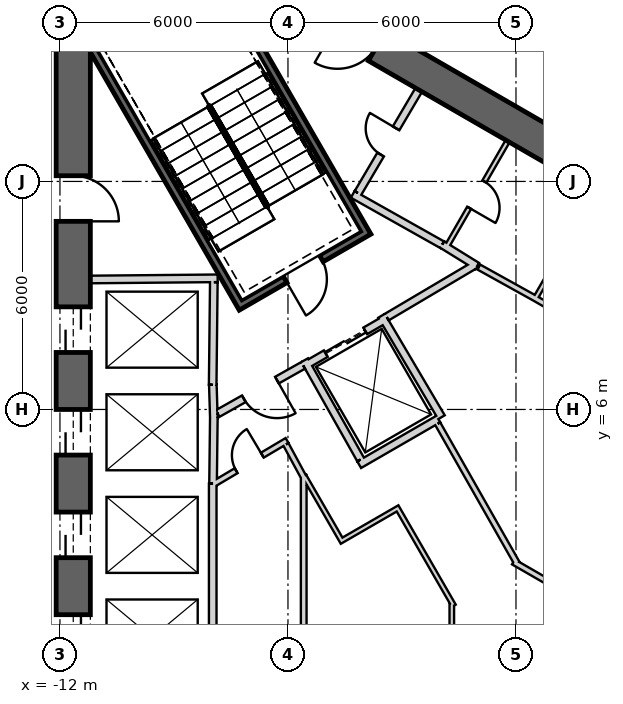
"""IFC4 building model, lengths in metres.
Left out: names, types, materials, properties, quantities, classifications, styles, units other than length and angle.
Written with IfcOpenShell. Run it as: python <this file> out.ifc"""

import sys

from ifc_helpers import new_model, si_unit, direction, frame, frame_2d, origin, place, context, subcontext, project, spatial, rectangle, extrude, element, fill, save


model = new_model("IFC4")
c1 = context("Model", 3, precision=1e-05, world=origin(), true_north=direction((0.0, 1.0)))
c2 = subcontext(c1, "Body", "Model", "MODEL_VIEW")
j1 = project(units=[si_unit("LENGTHUNIT", "METRE"), si_unit("PLANEANGLEUNIT", "RADIAN")], contexts=[c1])
p1 = place(None, origin())
s1 = spatial("IfcSite", under=j1, at=p1, CompositionType="ELEMENT")
p2 = place(p1, origin())
s2 = spatial("IfcBuilding", under=s1, at=p2, CompositionType="ELEMENT")
p3 = place(p2, frame((0.0, 0.0, 277.2)))
s3 = spatial("IfcBuildingStorey", under=s2, at=p3, CompositionType="ELEMENT", Elevation=277.2)
p4 = place(p3, frame((19.475, 2.208, 0.0), z_axis=(0.0, 0.0, 1.0), x_axis=(-0.866028369851, 0.499994862586, 0.0)))
e1 = element("IfcWall", 1, at=p4, inside=s3, PredefinedType="SHEAR", context=c2, shape_type="SweptSolid", body=[
    extrude(rectangle(XDim=31.523, YDim=0.9, at=frame_2d((15.762, 0.0))), origin(), (0.0, 0.0, 1.0), 6.5),
])
p5 = place(p4, frame((7.062, 0.0, 0.0)))
e2 = element("IfcOpeningElement", 2, at=p5, cuts=e1, PredefinedType="OPENING", context=c2, shape_type="SweptSolid", body=[
    extrude(rectangle(XDim=1.2, YDim=2.4, at=frame_2d((0.6, 1.2))), frame((0.0, 0.46, 0.0), z_axis=(0.0, -1.0, 0.0), x_axis=(1.0, 0.0, 0.0)), (0.0, 0.0, 1.0), 0.92),
])
p6 = place(p4, frame((3.612, 0.0, 0.0)))
e3 = element("IfcOpeningElement", 3, at=p6, cuts=e1, PredefinedType="OPENING", context=c2, shape_type="SweptSolid", body=[
    extrude(rectangle(XDim=1.2, YDim=2.4, at=frame_2d((0.6, 1.2))), frame((0.0, 0.46, 0.0), z_axis=(0.0, -1.0, 0.0), x_axis=(1.0, 0.0, 0.0)), (0.0, 0.0, 1.0), 0.92),
])
p7 = place(p4, frame((26.712, 0.0, 0.0)))
e4 = element("IfcOpeningElement", 4, at=p7, cuts=e1, PredefinedType="OPENING", context=c2, shape_type="SweptSolid", body=[
    extrude(rectangle(XDim=1.2, YDim=2.4, at=frame_2d((0.6, 1.2))), frame((0.0, 0.46, 0.0), z_axis=(0.0, -1.0, 0.0), x_axis=(1.0, 0.0, 0.0)), (0.0, 0.0, 1.0), 0.92),
])
p8 = place(p3, frame((-11.65, 15.762, 0.0), z_axis=(0.0, 0.0, 1.0), x_axis=(0.0, -1.0, 0.0)))
e5 = element("IfcWall", 5, at=p8, inside=s3, PredefinedType="SHEAR", context=c2, shape_type="SweptSolid", body=[
    extrude(rectangle(XDim=31.523, YDim=0.9, at=frame_2d((15.762, 0.0))), origin(), (0.0, 0.0, 1.0), 6.5),
])
p9 = place(p8, frame((7.062, 0.0, 0.0)))
e6 = element("IfcOpeningElement", 6, at=p9, cuts=e5, PredefinedType="OPENING", context=c2, shape_type="SweptSolid", body=[
    extrude(rectangle(XDim=1.2, YDim=2.4, at=frame_2d((0.6, 1.2))), frame((0.0, 0.46, 0.0), z_axis=(0.0, -1.0, 0.0), x_axis=(1.0, 0.0, 0.0)), (0.0, 0.0, 1.0), 0.92),
])
p10 = place(p8, frame((9.762, 0.0, 0.0)))
e7 = element("IfcOpeningElement", 7, at=p10, cuts=e5, PredefinedType="OPENING", context=c2, shape_type="SweptSolid", body=[
    extrude(rectangle(XDim=1.2, YDim=2.4, at=frame_2d((0.6, 1.2))), frame((0.0, 0.46, 0.0), z_axis=(0.0, -1.0, 0.0), x_axis=(1.0, 0.0, 0.0)), (0.0, 0.0, 1.0), 0.92),
])
p11 = place(p8, frame((12.462, 0.0, 0.0)))
e8 = element("IfcOpeningElement", 8, at=p11, cuts=e5, PredefinedType="OPENING", context=c2, shape_type="SweptSolid", body=[
    extrude(rectangle(XDim=1.2, YDim=2.4, at=frame_2d((0.6, 1.2))), frame((0.0, 0.46, 0.0), z_axis=(0.0, -1.0, 0.0), x_axis=(1.0, 0.0, 0.0)), (0.0, 0.0, 1.0), 0.92),
])
p12 = place(p8, frame((15.162, 0.0, 0.0)))
e9 = element("IfcOpeningElement", 9, at=p12, cuts=e5, PredefinedType="OPENING", context=c2, shape_type="SweptSolid", body=[
    extrude(rectangle(XDim=1.2, YDim=2.4, at=frame_2d((0.6, 1.2))), frame((0.0, 0.46, 0.0), z_axis=(0.0, -1.0, 0.0), x_axis=(1.0, 0.0, 0.0)), (0.0, 0.0, 1.0), 0.92),
])
p13 = place(p8, frame((17.862, 0.0, 0.0)))
e10 = element("IfcOpeningElement", 10, at=p13, cuts=e5, PredefinedType="OPENING", context=c2, shape_type="SweptSolid", body=[
    extrude(rectangle(XDim=1.2, YDim=2.4, at=frame_2d((0.6, 1.2))), frame((0.0, 0.46, 0.0), z_axis=(0.0, -1.0, 0.0), x_axis=(1.0, 0.0, 0.0)), (0.0, 0.0, 1.0), 0.92),
])
p14 = place(p8, frame((20.562, 0.0, 0.0)))
e11 = element("IfcOpeningElement", 11, at=p14, cuts=e5, PredefinedType="OPENING", context=c2, shape_type="SweptSolid", body=[
    extrude(rectangle(XDim=1.2, YDim=2.4, at=frame_2d((0.6, 1.2))), frame((0.0, 0.46, 0.0), z_axis=(0.0, -1.0, 0.0), x_axis=(1.0, 0.0, 0.0)), (0.0, 0.0, 1.0), 0.92),
])
p15 = place(p8, frame((23.262, 0.0, 0.0)))
e12 = element("IfcOpeningElement", 12, at=p15, cuts=e5, PredefinedType="OPENING", context=c2, shape_type="SweptSolid", body=[
    extrude(rectangle(XDim=1.2, YDim=2.4, at=frame_2d((0.6, 1.2))), frame((0.0, 0.46, 0.0), z_axis=(0.0, -1.0, 0.0), x_axis=(1.0, 0.0, 0.0)), (0.0, 0.0, 1.0), 0.92),
])
p16 = place(p8, frame((3.612, 0.0, 0.0)))
e13 = element("IfcOpeningElement", 13, at=p16, cuts=e5, PredefinedType="OPENING", context=c2, shape_type="SweptSolid", body=[
    extrude(rectangle(XDim=1.2, YDim=2.4, at=frame_2d((0.6, 1.2))), frame((0.0, 0.46, 0.0), z_axis=(0.0, -1.0, 0.0), x_axis=(1.0, 0.0, 0.0)), (0.0, 0.0, 1.0), 0.92),
])
p17 = place(p8, frame((26.712, 0.0, 0.0)))
e14 = element("IfcOpeningElement", 14, at=p17, cuts=e5, PredefinedType="OPENING", context=c2, shape_type="SweptSolid", body=[
    extrude(rectangle(XDim=1.2, YDim=2.4, at=frame_2d((0.6, 1.2))), frame((0.0, 0.46, 0.0), z_axis=(0.0, -1.0, 0.0), x_axis=(1.0, 0.0, 0.0)), (0.0, 0.0, 1.0), 0.92),
])
p18 = place(p3, frame((-11.2, 9.42, 0.0), z_axis=(0.0, 0.0, 1.0), x_axis=(0.999957167047, 0.009255488683, 0.0)))
e15 = element("IfcWall", 15, at=p18, inside=s3, PredefinedType="PLUMBINGWALL", context=c2, shape_type="SweptSolid", body=[
    extrude(rectangle(XDim=3.35, YDim=0.2, at=frame_2d((1.675, 0.0))), origin(), (0.0, 0.0, 1.0), 6.1),
])
p19 = place(p3, frame((-7.951, 9.35, 0.0), z_axis=(0.0, 0.0, 1.0), x_axis=(-0.011120469654, -0.999938165666, 0.0)))
e16 = element("IfcWall", 16, at=p19, inside=s3, PredefinedType="PLUMBINGWALL", context=c2, shape_type="SweptSolid", body=[
    extrude(rectangle(XDim=2.7, YDim=0.2, at=frame_2d((1.35, 0.0))), origin(), (0.0, 0.0, 1.0), 6.1),
])
p20 = place(p3, frame((-7.977, 6.65, 0.0), z_axis=(0.0, 0.0, 1.0), x_axis=(0.030861509705, -0.999523670164, 0.0)))
e17 = element("IfcWall", 17, at=p20, inside=s3, PredefinedType="PLUMBINGWALL", context=c2, shape_type="SweptSolid", body=[
    extrude(rectangle(XDim=0.878, YDim=0.2, at=frame_2d((0.439, 0.0))), origin(), (0.0, 0.0, 1.0), 6.1),
])
p21 = place(p3, frame((-7.949, 5.895, 0.0), z_axis=(0.0, 0.0, 1.0), x_axis=(-0.012042535896, -0.999927486035, 0.0)))
e18 = element("IfcWall", 18, at=p21, inside=s3, PredefinedType="PLUMBINGWALL", context=c2, shape_type="SweptSolid", body=[
    extrude(rectangle(XDim=1.845, YDim=0.2, at=frame_2d((0.922, 0.0))), origin(), (0.0, 0.0, 1.0), 6.1),
])
p22 = place(p3, frame((-7.98, 4.05, 0.0), z_axis=(0.0, 0.0, 1.0), x_axis=(0.0, -1.0, 0.0)))
e19 = element("IfcWall", 19, at=p22, inside=s3, PredefinedType="PLUMBINGWALL", context=c2, shape_type="SweptSolid", body=[
    extrude(rectangle(XDim=8.1, YDim=0.2, at=frame_2d((4.05, 0.0))), origin(), (0.0, 0.0, 1.0), 6.1),
])
p23 = place(p3, frame((-11.245, 15.678, -0.35), z_axis=(0.0, 0.0, 1.0), x_axis=(0.499977274689, -0.866038523851, 0.0)))
e20 = element("IfcWall", 20, at=p23, inside=s3, PredefinedType="SHEAR", context=c2, shape_type="SweptSolid", body=[
    extrude(rectangle(XDim=8.1, YDim=0.2, at=frame_2d((4.05, 0.0))), origin(), (0.0, 0.0, 1.0), 6.45),
])
p24 = place(p3, frame((-7.854, 17.405, -0.35), z_axis=(0.0, 0.0, 1.0), x_axis=(0.499997992926, -0.866026562566, 0.0)))
e21 = element("IfcWall", 21, at=p24, inside=s3, PredefinedType="SHEAR", context=c2, shape_type="SweptSolid", body=[
    extrude(rectangle(XDim=7.9, YDim=0.2, at=frame_2d((3.95, 0.0))), origin(), (0.0, 0.0, 1.0), 6.45),
])
p25 = place(p3, frame((-7.159, 8.8, -0.35), z_axis=(0.0, 0.0, 1.0), x_axis=(0.866047807691, 0.499961193289, 0.0)))
e22 = element("IfcWall", 22, at=p25, inside=s3, PredefinedType="SHEAR", context=c2, shape_type="SweptSolid", body=[
    extrude(rectangle(XDim=3.6, YDim=0.2, at=frame_2d((1.8, 0.0))), origin(), (0.0, 0.0, 1.0), 6.45),
])
p26 = place(p25, frame((1.25, 0.0, 0.35)))
e23 = element("IfcOpeningElement", 23, at=p26, cuts=e22, PredefinedType="OPENING", context=c2, shape_type="SweptSolid", body=[
    extrude(rectangle(XDim=1.1, YDim=2.1, at=frame_2d((0.55, 1.05))), frame((0.0, 0.11, 0.0), z_axis=(0.0, -1.0, 0.0), x_axis=(1.0, 0.0, 0.0)), (0.0, 0.0, 1.0), 0.22),
])
p27 = place(p3, frame((-5.524, 7.168, 0.0), z_axis=(0.0, 0.0, 1.0), x_axis=(0.866024647952, 0.500001309137, 0.0)))
e24 = element("IfcWall", 24, at=p27, inside=s3, PredefinedType="PLUMBINGWALL", context=c2, shape_type="SweptSolid", body=[
    extrude(rectangle(XDim=2.4, YDim=0.2, at=frame_2d((1.2, 0.0))), origin(), (0.0, 0.0, 1.0), 6.1),
])
p28 = place(p27, frame((0.6, 0.0, 0.0)))
e25 = element("IfcOpeningElement", 25, at=p28, cuts=e24, PredefinedType="OPENING", context=c2, shape_type="SweptSolid", body=[
    extrude(rectangle(XDim=1.2, YDim=2.4, at=frame_2d((0.6, 1.2))), frame((0.0, 0.11, 0.0), z_axis=(0.0, -1.0, 0.0), x_axis=(1.0, 0.0, 0.0)), (0.0, 0.0, 1.0), 0.22),
])
p29 = place(p3, frame((-3.538, 8.465, 0.0), z_axis=(0.0, 0.0, 1.0), x_axis=(0.508647062354, -0.860975125052, 0.0)))
e26 = element("IfcWall", 26, at=p29, inside=s3, PredefinedType="PLUMBINGWALL", context=c2, shape_type="SweptSolid", body=[
    extrude(rectangle(XDim=3.1, YDim=0.2, at=frame_2d((1.55, 0.0))), origin(), (0.0, 0.0, 1.0), 6.1),
])
p30 = place(p3, frame((-2.043, 5.748, 0.0), z_axis=(0.0, 0.0, 1.0), x_axis=(-0.866035096217, -0.499983211839, 0.0)))
e27 = element("IfcWall", 27, at=p30, inside=s3, PredefinedType="PLUMBINGWALL", context=c2, shape_type="SweptSolid", body=[
    extrude(rectangle(XDim=2.404, YDim=0.2, at=frame_2d((1.202, 0.0))), origin(), (0.0, 0.0, 1.0), 6.1),
])
p31 = place(p3, frame((-5.562, 7.296, 0.0), z_axis=(0.0, 0.0, 1.0), x_axis=(0.49134651263, -0.870964180966, 0.0)))
e28 = element("IfcWall", 28, at=p31, inside=s3, PredefinedType="PLUMBINGWALL", context=c2, shape_type="SweptSolid", body=[
    extrude(rectangle(XDim=3.0, YDim=0.2, at=frame_2d((1.5, 0.0))), origin(), (0.0, 0.0, 1.0), 6.1),
])
p32 = place(p3, frame((2.119, 11.709, 0.0), z_axis=(0.0, 0.0, 1.0), x_axis=(-0.500017246033, -0.866015446554, 0.0)))
e29 = element("IfcWall", 29, at=p32, inside=s3, PredefinedType="PARTITIONING", context=c2, shape_type="SweptSolid", body=[
    extrude(rectangle(XDim=3.25, YDim=0.12, at=frame_2d((1.625, 0.0))), origin(), (0.0, 0.0, 1.0), 6.1),
])
p33 = place(p32, frame((1.225, 0.0, 0.0)))
e30 = element("IfcOpeningElement", 30, at=p33, cuts=e29, PredefinedType="OPENING", context=c2, shape_type="SweptSolid", body=[
    extrude(rectangle(XDim=0.8, YDim=2.1, at=frame_2d((0.4, 1.05))), frame((0.0, 0.07, 0.0), z_axis=(0.0, -1.0, 0.0), x_axis=(1.0, 0.0, 0.0)), (0.0, 0.0, 1.0), 0.14),
])
p34 = place(p3, frame((5.159, 6.236, 0.0), z_axis=(0.0, 0.0, 1.0), x_axis=(-0.866028230842, 0.499995103361, 0.0)))
e31 = element("IfcWall", 31, at=p34, inside=s3, PredefinedType="PLUMBINGWALL", context=c2, shape_type="SweptSolid", body=[
    extrude(rectangle(XDim=5.4, YDim=0.15, at=frame_2d((2.7, 0.0))), origin(), (0.0, 0.0, 1.0), 6.1),
])
p35 = place(p34, frame((2.3, 0.0, 0.0)))
e32 = element("IfcOpeningElement", 32, at=p35, cuts=e31, PredefinedType="OPENING", context=c2, shape_type="SweptSolid", body=[
    extrude(rectangle(XDim=0.8, YDim=2.1, at=frame_2d((0.4, 1.05))), frame((0.0, 0.085, 0.0), z_axis=(0.0, -1.0, 0.0), x_axis=(1.0, 0.0, 0.0)), (0.0, 0.0, 1.0), 0.17),
])
p36 = place(p3, frame((-0.22, 13.06, 0.0), z_axis=(0.0, 0.0, 1.0), x_axis=(-0.499984717929, -0.866034226713, 0.0)))
e33 = element("IfcWall", 33, at=p36, inside=s3, PredefinedType="PARTITIONING", context=c2, shape_type="SweptSolid", body=[
    extrude(rectangle(XDim=3.25, YDim=0.12, at=frame_2d((1.625, 0.0))), origin(), (0.0, 0.0, 1.0), 6.1),
])
p37 = place(p36, frame((1.225, 0.0, 0.0)))
e34 = element("IfcOpeningElement", 34, at=p37, cuts=e33, PredefinedType="OPENING", context=c2, shape_type="SweptSolid", body=[
    extrude(rectangle(XDim=0.8, YDim=2.1, at=frame_2d((0.4, 1.05))), frame((0.0, 0.07, 0.0), z_axis=(0.0, -1.0, 0.0), x_axis=(1.0, 0.0, 0.0)), (0.0, 0.0, 1.0), 0.14),
])
p38 = place(p3, frame((-1.941, 10.339, 0.0), z_axis=(0.0, 0.0, 1.0), x_axis=(0.850216889117, -0.526432561171, 0.0)))
e35 = element("IfcWall", 35, at=p38, inside=s3, PredefinedType="PARTITIONING", context=c2, shape_type="SweptSolid", body=[
    extrude(rectangle(XDim=1.078, YDim=0.2, at=frame_2d((0.539, 0.0))), origin(), (0.0, 0.0, 1.0), 6.1),
])
p39 = place(p3, frame((0.483, 8.936, 0.0), z_axis=(0.0, 0.0, 1.0), x_axis=(-0.874315691004, 0.485357674776, 0.0)))
e36 = element("IfcWall", 36, at=p39, inside=s3, PredefinedType="PLUMBINGWALL", context=c2, shape_type="SweptSolid", body=[
    extrude(rectangle(XDim=1.671, YDim=0.15, at=frame_2d((0.836, 0.0))), origin(), (0.0, 0.0, 1.0), 6.1),
])
p40 = place(p3, frame((-4.296, 11.659, 0.0), z_axis=(0.0, 0.0, 1.0), x_axis=(0.871534483978, -0.490334215854, 0.0)))
e37 = element("IfcWall", 37, at=p40, inside=s3, PredefinedType="PARTITIONING", context=c2, shape_type="SweptSolid", body=[
    extrude(rectangle(XDim=2.7, YDim=0.2, at=frame_2d((1.35, 0.0))), origin(), (0.0, 0.0, 1.0), 6.1),
])
p41 = place(p3, frame((-2.558, 14.409, 0.0), z_axis=(0.0, 0.0, 1.0), x_axis=(-0.508018930956, -0.861345903683, 0.0)))
e38 = element("IfcWall", 38, at=p41, inside=s3, PredefinedType="PARTITIONING", context=c2, shape_type="SweptSolid", body=[
    extrude(rectangle(XDim=3.15, YDim=0.2, at=frame_2d((1.575, 0.0))), origin(), (0.0, 0.0, 1.0), 6.1),
])
p42 = place(p41, frame((1.175, 0.0, 0.0)))
e39 = element("IfcOpeningElement", 39, at=p42, cuts=e38, PredefinedType="OPENING", context=c2, shape_type="SweptSolid", body=[
    extrude(rectangle(XDim=0.8, YDim=2.1, at=frame_2d((0.4, 1.05))), frame((0.0, 0.11, 0.0), z_axis=(0.0, -1.0, 0.0), x_axis=(1.0, 0.0, 0.0)), (0.0, 0.0, 1.0), 0.22),
])
p43 = place(p3, frame((-1.056, 9.818, 0.0), z_axis=(0.0, 0.0, 1.0), x_axis=(-0.860599924646, -0.509281621207, 0.0)))
e40 = element("IfcWall", 40, at=p43, inside=s3, PredefinedType="PARTITIONING", context=c2, shape_type="SweptSolid", body=[
    extrude(rectangle(XDim=2.725, YDim=0.2, at=frame_2d((1.362, 0.0))), origin(), (0.0, 0.0, 1.0), 6.1),
])
p44 = place(p3, frame((-5.6, 7.16, 0.0), z_axis=(0.0, 0.0, 1.0), x_axis=(-0.871363259478, -0.490638431059, 0.0)))
e41 = element("IfcWall", 41, at=p44, inside=s3, PredefinedType="PARTITIONING", context=c2, shape_type="SweptSolid", body=[
    extrude(rectangle(XDim=2.581, YDim=0.2, at=frame_2d((1.291, 0.0))), origin(), (0.0, 0.0, 1.0), 6.1),
])
p45 = place(p44, frame((0.791, 0.0, 0.0)))
e42 = element("IfcOpeningElement", 42, at=p45, cuts=e41, PredefinedType="OPENING", context=c2, shape_type="SweptSolid", body=[
    extrude(rectangle(XDim=1.0, YDim=2.1, at=frame_2d((0.5, 1.05))), frame((0.0, 0.11, 0.0), z_axis=(0.0, -1.0, 0.0), x_axis=(1.0, 0.0, 0.0)), (0.0, 0.0, 1.0), 0.22),
])
p46 = place(p3, frame((-0.067, 1.989, 0.0), z_axis=(0.0, 0.0, 1.0), x_axis=(0.865981695925, -0.500075696594, 0.0)))
e43 = element("IfcWall", 43, at=p46, inside=s3, PredefinedType="PLUMBINGWALL", context=c2, shape_type="SweptSolid", body=[
    extrude(rectangle(XDim=1.954, YDim=0.15, at=frame_2d((0.977, 0.0))), origin(), (0.0, 0.0, 1.0), 6.1),
])
p47 = place(p3, frame((-2.059, 5.624, 0.0), z_axis=(0.0, 0.0, 1.0), x_axis=(0.494149180773, -0.869377125959, 0.0)))
e44 = element("IfcWall", 44, at=p47, inside=s3, PredefinedType="PLUMBINGWALL", context=c2, shape_type="SweptSolid", body=[
    extrude(rectangle(XDim=4.231, YDim=0.15, at=frame_2d((2.116, 0.0))), origin(), (0.0, 0.0, 1.0), 6.1),
])
p48 = place(p3, frame((-5.586, -4.275, 0.0), z_axis=(0.0, 0.0, 1.0), x_axis=(0.0, 1.0, 0.0)))
e45 = element("IfcWall", 45, at=p48, inside=s3, PredefinedType="PLUMBINGWALL", context=c2, shape_type="SweptSolid", body=[
    extrude(rectangle(XDim=8.549, YDim=0.15, at=frame_2d((4.275, 0.0))), origin(), (0.0, 0.0, 1.0), 6.1),
])
p49 = place(p3, frame((-6.024, 5.183, 0.0), z_axis=(0.0, 0.0, 1.0), x_axis=(-0.860126804455, -0.510080268447, 0.0)))
e46 = element("IfcWall", 46, at=p49, inside=s3, PredefinedType="PLUMBINGWALL", context=c2, shape_type="SweptSolid", body=[
    extrude(rectangle(XDim=2.24, YDim=0.15, at=frame_2d((1.12, 0.0))), origin(), (0.0, 0.0, 1.0), 6.1),
])
p50 = place(p49, frame((0.757, 0.0, 0.0)))
e47 = element("IfcOpeningElement", 47, at=p50, cuts=e46, PredefinedType="OPENING", context=c2, shape_type="SweptSolid", body=[
    extrude(rectangle(XDim=0.8, YDim=2.1, at=frame_2d((0.4, 1.05))), frame((0.0, 0.085, 0.0), z_axis=(0.0, -1.0, 0.0), x_axis=(1.0, 0.0, 0.0)), (0.0, 0.0, 1.0), 0.17),
])
p51 = place(p3, frame((-5.571, 4.19, 0.0), z_axis=(0.0, 0.0, 1.0), x_axis=(-0.476127658675, 0.879376172434, 0.0)))
e48 = element("IfcWall", 48, at=p51, inside=s3, PredefinedType="PLUMBINGWALL", context=c2, shape_type="SweptSolid", body=[
    extrude(rectangle(XDim=1.012, YDim=0.15, at=frame_2d((0.506, 0.0))), origin(), (0.0, 0.0, 1.0), 6.1),
])
p52 = place(p3, frame((-4.558, 2.495, 0.0), z_axis=(0.0, 0.0, 1.0), x_axis=(-0.499990325971, 0.866030989016, 0.0)))
e49 = element("IfcWall", 49, at=p52, inside=s3, PredefinedType="PARTITIONING", context=c2, shape_type="SweptSolid", body=[
    extrude(rectangle(XDim=2.025, YDim=0.12, at=frame_2d((1.012, 0.0))), origin(), (0.0, 0.0, 1.0), 6.1),
])
p53 = place(p3, frame((-3.064, 3.427, 0.0), z_axis=(0.0, 0.0, 1.0), x_axis=(-0.866087547558, -0.499892348375, 0.0)))
e50 = element("IfcWall", 50, at=p53, inside=s3, PredefinedType="PARTITIONING", context=c2, shape_type="SweptSolid", body=[
    extrude(rectangle(XDim=1.7, YDim=0.12, at=frame_2d((0.85, 0.0))), origin(), (0.0, 0.0, 1.0), 6.1),
])
p54 = place(p3, frame((-1.637, 0.835, 0.0), z_axis=(0.0, 0.0, 1.0), x_axis=(-0.499980071345, 0.866036909293, 0.0)))
e51 = element("IfcWall", 51, at=p54, inside=s3, PredefinedType="PARTITIONING", context=c2, shape_type="SweptSolid", body=[
    extrude(rectangle(XDim=2.898, YDim=0.12, at=frame_2d((1.449, 0.0))), origin(), (0.0, 0.0, 1.0), 6.1),
])
p55 = place(p3, frame((-1.689, -1.029, 0.0), z_axis=(0.0, 0.0, 1.0), x_axis=(0.0, 1.0, 0.0)))
e52 = element("IfcWall", 52, at=p55, inside=s3, PredefinedType="PARTITIONING", context=c2, shape_type="SweptSolid", body=[
    extrude(rectangle(XDim=1.935, YDim=0.12, at=frame_2d((0.968, 0.0))), origin(), (0.0, 0.0, 1.0), 6.1),
])
p56 = place(p26, origin())
e53 = element("IfcDoor", 53, at=p56, inside=s3, OperationType="SINGLE_SWING_LEFT", PredefinedType="USERDEFINED", context=c2, shape_type="SweptSolid", body=[
    extrude(rectangle(XDim=1.1, YDim=2.1, at=frame_2d((0.55, 1.05))), frame((0.0, 0.025, 0.0), z_axis=(0.0, -1.0, 0.0), x_axis=(1.0, 0.0, 0.0)), (0.0, 0.0, 1.0), 0.05),
])
fill(e23, e53)
p57 = place(p45, origin())
e54 = element("IfcDoor", 54, at=p57, inside=s3, OperationType="SINGLE_SWING_LEFT", PredefinedType="USERDEFINED", context=c2, shape_type="SweptSolid", body=[
    extrude(rectangle(XDim=1.0, YDim=2.1, at=frame_2d((0.5, 1.05))), frame((0.0, 0.025, 0.0), z_axis=(0.0, -1.0, 0.0), x_axis=(1.0, 0.0, 0.0)), (0.0, 0.0, 1.0), 0.05),
])
fill(e42, e54)
p58 = place(p28, origin())
e55 = element("IfcDoor", 55, at=p58, inside=s3, OperationType="SLIDING_TO_LEFT", PredefinedType="USERDEFINED", context=c2, shape_type="SweptSolid", body=[
    extrude(rectangle(XDim=1.2, YDim=2.4, at=frame_2d((0.6, 1.2))), frame((0.0, 0.025, 0.0), z_axis=(0.0, -1.0, 0.0), x_axis=(1.0, 0.0, 0.0)), (0.0, 0.0, 1.0), 0.05),
])
fill(e25, e55)
p59 = place(p50, origin())
e56 = element("IfcDoor", 56, at=p59, inside=s3, OperationType="SINGLE_SWING_LEFT", PredefinedType="USERDEFINED", context=c2, shape_type="SweptSolid", body=[
    extrude(rectangle(XDim=0.8, YDim=2.1, at=frame_2d((0.4, 1.05))), frame((0.0, 0.025, 0.0), z_axis=(0.0, -1.0, 0.0), x_axis=(1.0, 0.0, 0.0)), (0.0, 0.0, 1.0), 0.05),
])
fill(e47, e56)
p60 = place(p42, origin())
e57 = element("IfcDoor", 57, at=p60, inside=s3, OperationType="SINGLE_SWING_LEFT", PredefinedType="USERDEFINED", context=c2, shape_type="SweptSolid", body=[
    extrude(rectangle(XDim=0.8, YDim=2.1, at=frame_2d((0.4, 1.05))), frame((0.0, 0.025, 0.0), z_axis=(0.0, -1.0, 0.0), x_axis=(1.0, 0.0, 0.0)), (0.0, 0.0, 1.0), 0.05),
])
fill(e39, e57)
p61 = place(p37, origin())
e58 = element("IfcDoor", 58, at=p61, inside=s3, OperationType="SINGLE_SWING_RIGHT", PredefinedType="USERDEFINED", context=c2, shape_type="SweptSolid", body=[
    extrude(rectangle(XDim=0.8, YDim=2.1, at=frame_2d((0.4, 1.05))), frame((0.0, 0.025, 0.0), z_axis=(0.0, -1.0, 0.0), x_axis=(1.0, 0.0, 0.0)), (0.0, 0.0, 1.0), 0.05),
])
fill(e34, e58)
p62 = place(p9, origin())
e59 = element("IfcDoor", 59, at=p62, inside=s3, OperationType="SLIDING_TO_LEFT", PredefinedType="USERDEFINED", context=c2, shape_type="SweptSolid", body=[
    extrude(rectangle(XDim=1.2, YDim=2.4, at=frame_2d((0.6, 1.2))), frame((0.0, 0.025, 0.0), z_axis=(0.0, -1.0, 0.0), x_axis=(1.0, 0.0, 0.0)), (0.0, 0.0, 1.0), 0.05),
])
fill(e6, e59)
p63 = place(p10, origin())
e60 = element("IfcDoor", 60, at=p63, inside=s3, OperationType="SLIDING_TO_LEFT", PredefinedType="USERDEFINED", context=c2, shape_type="SweptSolid", body=[
    extrude(rectangle(XDim=1.2, YDim=2.4, at=frame_2d((0.6, 1.2))), frame((0.0, 0.025, 0.0), z_axis=(0.0, -1.0, 0.0), x_axis=(1.0, 0.0, 0.0)), (0.0, 0.0, 1.0), 0.05),
])
fill(e7, e60)
p64 = place(p11, origin())
e61 = element("IfcDoor", 61, at=p64, inside=s3, OperationType="SLIDING_TO_LEFT", PredefinedType="USERDEFINED", context=c2, shape_type="SweptSolid", body=[
    extrude(rectangle(XDim=1.2, YDim=2.4, at=frame_2d((0.6, 1.2))), frame((0.0, 0.025, 0.0), z_axis=(0.0, -1.0, 0.0), x_axis=(1.0, 0.0, 0.0)), (0.0, 0.0, 1.0), 0.05),
])
fill(e8, e61)
p65 = place(p12, origin())
e62 = element("IfcDoor", 62, at=p65, inside=s3, OperationType="SLIDING_TO_LEFT", PredefinedType="USERDEFINED", context=c2, shape_type="SweptSolid", body=[
    extrude(rectangle(XDim=1.2, YDim=2.4, at=frame_2d((0.6, 1.2))), frame((0.0, 0.025, 0.0), z_axis=(0.0, -1.0, 0.0), x_axis=(1.0, 0.0, 0.0)), (0.0, 0.0, 1.0), 0.05),
])
fill(e9, e62)
p66 = place(p16, origin())
e63 = element("IfcDoor", 63, at=p66, inside=s3, OperationType="SINGLE_SWING_RIGHT", PredefinedType="USERDEFINED", context=c2, shape_type="SweptSolid", body=[
    extrude(rectangle(XDim=1.2, YDim=2.4, at=frame_2d((0.6, 1.2))), frame((0.0, 0.025, 0.0), z_axis=(0.0, -1.0, 0.0), x_axis=(1.0, 0.0, 0.0)), (0.0, 0.0, 1.0), 0.05),
])
fill(e13, e63)
save(model, sys.argv[1])
